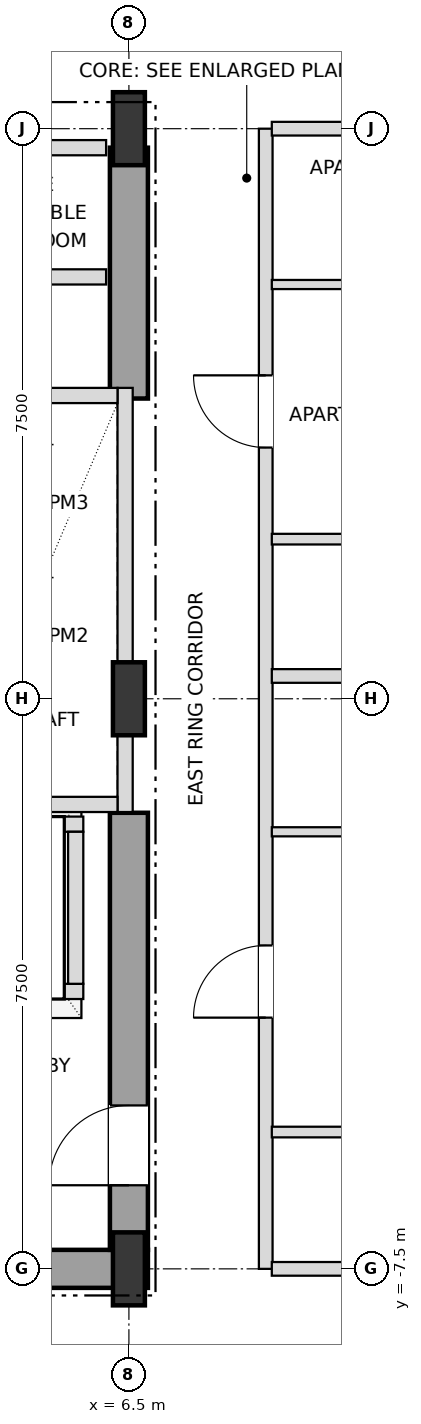
"""IFC4 building model, lengths in metres.
Left out: names, types, materials, properties, quantities, classifications, styles, units other than length and angle.
Written with IfcOpenShell. Run it as: python <this file> out.ifc"""

import sys

from ifc_helpers import new_model, si_unit, direction, frame, frame_2d, origin, origin_2d, place, context, subcontext, project, spatial, rectangle, i_section, extrude, element, fill, save


model = new_model("IFC4")
c1 = context("Model", 3, precision=1e-05, world=origin(), true_north=direction((0.0, 1.0)))
c2 = subcontext(c1, "Body", "Model", "MODEL_VIEW")
j1 = project(units=[si_unit("LENGTHUNIT", "METRE"), si_unit("PLANEANGLEUNIT", "RADIAN")], contexts=[c1])
p1 = place(None, origin())
s1 = spatial("IfcSite", under=j1, at=p1, CompositionType="ELEMENT")
p2 = place(p1, origin())
s2 = spatial("IfcBuilding", under=s1, at=p2, CompositionType="ELEMENT")
p3 = place(p2, frame((0.0, 0.0, 72.0)))
s3 = spatial("IfcBuildingStorey", under=s2, at=p3, CompositionType="ELEMENT", Elevation=72.0)
for number, where, z_axis, x_axis in (
    (1, (6.5, -7.5, 0.0), (0.0, 0.0, 1.0), (1.0, 0.0, 0.0)),
    (2, (6.5, 0.0, 0.0), (0.0, 0.0, 1.0), (1.0, 0.0, 0.0)),
    (3, (6.5, 7.5, 0.0), (0.0, 0.0, 1.0), (1.0, 0.0, 0.0)),
):
    element("IfcColumn", number, at=place(p3, frame(where, z_axis=z_axis, x_axis=x_axis)), inside=s3, PredefinedType="COLUMN", context=c2, shape_type="SweptSolid", body=[
        extrude(i_section(OverallWidth=0.42, OverallDepth=0.96, WebThickness=0.022, FlangeThickness=0.034, at=origin_2d()), origin(), (0.0, 0.0, 1.0), 3.6),
    ])
p4 = place(p3, frame((0.0, -7.5, 0.0), z_axis=(0.0, 0.0, 1.0), x_axis=(1.0, 0.0, 0.0)))
e4 = element("IfcWall", 4, at=p4, inside=s3, PredefinedType="SHEAR", context=c2, shape_type="SweptSolid", body=[
    extrude(rectangle(XDim=6.75, YDim=0.5, at=frame_2d((3.375, 0.0))), origin(), (0.0, 0.0, 1.0), 3.38),
])
p5 = place(p3, frame((6.5, -7.25, 0.0), z_axis=(0.0, 0.0, 1.0), x_axis=(0.0, 1.0, 0.0)))
e5 = element("IfcWall", 5, at=p5, inside=s3, PredefinedType="SHEAR", context=c2, shape_type="SweptSolid", body=[
    extrude(rectangle(XDim=5.75, YDim=0.5, at=frame_2d((2.875, 0.0))), origin(), (0.0, 0.0, 1.0), 3.38),
])
p6 = place(p5, frame((0.85, 0.0, 0.0)))
e6 = element("IfcOpeningElement", 6, at=p6, cuts=e5, PredefinedType="OPENING", context=c2, shape_type="SweptSolid", body=[
    extrude(rectangle(XDim=1.05, YDim=2.15, at=frame_2d((0.525, 1.075))), frame((0.0, 0.26, 0.0), z_axis=(0.0, -1.0, 0.0), x_axis=(1.0, 0.0, 0.0)), (0.0, 0.0, 1.0), 0.52),
])
p7 = place(p3, frame((6.5, 3.95, 0.0), z_axis=(0.0, 0.0, 1.0), x_axis=(0.0, 1.0, 0.0)))
e7 = element("IfcWall", 7, at=p7, inside=s3, PredefinedType="SHEAR", context=c2, shape_type="SweptSolid", body=[
    extrude(rectangle(XDim=3.3, YDim=0.5, at=frame_2d((1.65, 0.0))), origin(), (0.0, 0.0, 1.0), 3.38),
])
p8 = place(p3, frame((6.45, -1.49, 0.0), z_axis=(0.0, 0.0, 1.0), x_axis=(0.0, 1.0, 0.0)))
e8 = element("IfcWall", 8, at=p8, inside=s3, PredefinedType="SOLIDWALL", context=c2, shape_type="SweptSolid", body=[
    extrude(rectangle(XDim=5.58, YDim=0.2, at=frame_2d((2.79, 0.0))), origin(), (0.0, 0.0, 1.0), 2.816),
])
for number, where, z_axis, x_axis in (
    (9, (4.15, -1.39, 0.0), (0.0, 0.0, 1.0), (1.0, 0.0, 0.0)),
    (10, (4.15, 3.99, 0.0), (0.0, 0.0, 1.0), (1.0, 0.0, 0.0)),
):
    element("IfcWall", number, at=place(p3, frame(where, z_axis=z_axis, x_axis=x_axis)), inside=s3, PredefinedType="SOLIDWALL", context=c2, shape_type="SweptSolid", body=[
        extrude(rectangle(XDim=2.2, YDim=0.2, at=frame_2d((1.1, 0.0))), origin(), (0.0, 0.0, 1.0), 3.38),
    ])
p9 = place(p3, frame((1.8, -3.85, 0.0), z_axis=(0.0, 0.0, 1.0), x_axis=(1.0, 0.0, 0.0)))
e11 = element("IfcWall", 11, at=p9, inside=s3, PredefinedType="SOLIDWALL", context=c2, shape_type="SweptSolid", body=[
    extrude(rectangle(XDim=4.1, YDim=0.2, at=frame_2d((2.05, 0.0))), origin(), (0.0, 0.0, 1.0), 3.38),
])
p10 = place(p9, frame((0.45, 0.0, 0.0)))
e12 = element("IfcOpeningElement", 12, at=p10, cuts=e11, PredefinedType="OPENING", context=c2, shape_type="SweptSolid", body=[
    extrude(rectangle(XDim=1.2, YDim=2.2, at=frame_2d((0.6, 1.1))), frame((0.0, 0.11, 0.0), z_axis=(0.0, -1.0, 0.0), x_axis=(1.0, 0.0, 0.0)), (0.0, 0.0, 1.0), 0.22),
])
p11 = place(p9, frame((2.45, 0.0, 0.0)))
e13 = element("IfcOpeningElement", 13, at=p11, cuts=e11, PredefinedType="OPENING", context=c2, shape_type="SweptSolid", body=[
    extrude(rectangle(XDim=1.2, YDim=2.2, at=frame_2d((0.6, 1.1))), frame((0.0, 0.11, 0.0), z_axis=(0.0, -1.0, 0.0), x_axis=(1.0, 0.0, 0.0)), (0.0, 0.0, 1.0), 0.22),
])
p12 = place(p3, frame((1.8, -1.65, 0.0), z_axis=(0.0, 0.0, 1.0), x_axis=(1.0, 0.0, 0.0)))
e14 = element("IfcWall", 14, at=p12, inside=s3, PredefinedType="SOLIDWALL", context=c2, shape_type="SweptSolid", body=[
    extrude(rectangle(XDim=4.1, YDim=0.2, at=frame_2d((2.05, 0.0))), origin(), (0.0, 0.0, 1.0), 3.38),
])
p13 = place(p3, frame((5.8, -3.75, 0.0), z_axis=(0.0, 0.0, 1.0), x_axis=(0.0, 1.0, 0.0)))
e15 = element("IfcWall", 15, at=p13, inside=s3, PredefinedType="SOLIDWALL", context=c2, shape_type="SweptSolid", body=[
    extrude(rectangle(XDim=2.0, YDim=0.2, at=frame_2d((1.0, 0.0))), origin(), (0.0, 0.0, 1.0), 3.38),
])
p14 = place(p3, frame((8.3, -7.5, 0.0), z_axis=(0.0, 0.0, 1.0), x_axis=(0.0, 1.0, 0.0)))
e16 = element("IfcWall", 16, at=p14, inside=s3, PredefinedType="PARTITIONING", context=c2, shape_type="SweptSolid", body=[
    extrude(rectangle(XDim=15.0, YDim=0.18, at=frame_2d((7.5, 0.0))), origin(), (0.0, 0.0, 1.0), 3.38),
])
p15 = place(p14, frame((3.305, 0.0, 0.0)))
e17 = element("IfcOpeningElement", 17, at=p15, cuts=e16, PredefinedType="OPENING", context=c2, shape_type="SweptSolid", body=[
    extrude(rectangle(XDim=0.95, YDim=2.15, at=frame_2d((0.475, 1.075))), frame((0.0, 0.1, 0.0), z_axis=(0.0, -1.0, 0.0), x_axis=(1.0, 0.0, 0.0)), (0.0, 0.0, 1.0), 0.2),
])
p16 = place(p14, frame((10.805, 0.0, 0.0)))
e18 = element("IfcOpeningElement", 18, at=p16, cuts=e16, PredefinedType="OPENING", context=c2, shape_type="SweptSolid", body=[
    extrude(rectangle(XDim=0.95, YDim=2.15, at=frame_2d((0.475, 1.075))), frame((0.0, 0.1, 0.0), z_axis=(0.0, -1.0, 0.0), x_axis=(1.0, 0.0, 0.0)), (0.0, 0.0, 1.0), 0.2),
])
p17 = place(p3, frame((8.38, -7.5, 0.0), z_axis=(0.0, 0.0, 1.0), x_axis=(1.0, 0.0, 0.0)))
e19 = element("IfcWall", 19, at=p17, inside=s3, PredefinedType="PARTITIONING", context=c2, shape_type="SweptSolid", body=[
    extrude(rectangle(XDim=7.64, YDim=0.18, at=frame_2d((3.82, 0.0))), origin(), (0.0, 0.0, 1.0), 2.816),
])
p18 = place(p3, frame((8.38, -5.7, 0.0), z_axis=(0.0, 0.0, 1.0), x_axis=(1.0, 0.0, 0.0)))
e20 = element("IfcWall", 20, at=p18, inside=s3, PredefinedType="PARTITIONING", context=c2, shape_type="SweptSolid", body=[
    extrude(rectangle(XDim=7.64, YDim=0.14, at=frame_2d((3.82, 0.0))), origin(), (0.0, 0.0, 1.0), 2.948),
])
p19 = place(p18, frame((3.37, 0.0, 0.0)))
e21 = element("IfcOpeningElement", 21, at=p19, cuts=e20, PredefinedType="OPENING", context=c2, shape_type="SweptSolid", body=[
    extrude(rectangle(XDim=0.9, YDim=2.1, at=frame_2d((0.45, 1.05))), frame((0.0, 0.08, 0.0), z_axis=(0.0, -1.0, 0.0), x_axis=(1.0, 0.0, 0.0)), (0.0, 0.0, 1.0), 0.16),
])
p20 = place(p3, frame((8.38, -1.75, 0.0), z_axis=(0.0, 0.0, 1.0), x_axis=(1.0, 0.0, 0.0)))
e22 = element("IfcWall", 22, at=p20, inside=s3, PredefinedType="PARTITIONING", context=c2, shape_type="SweptSolid", body=[
    extrude(rectangle(XDim=7.64, YDim=0.12, at=frame_2d((3.82, 0.0))), origin(), (0.0, 0.0, 1.0), 2.948),
])
p21 = place(p20, frame((3.345, 0.0, 0.0)))
e23 = element("IfcOpeningElement", 23, at=p21, cuts=e22, PredefinedType="OPENING", context=c2, shape_type="SweptSolid", body=[
    extrude(rectangle(XDim=0.95, YDim=2.1, at=frame_2d((0.475, 1.05))), frame((0.0, 0.07, 0.0), z_axis=(0.0, -1.0, 0.0), x_axis=(1.0, 0.0, 0.0)), (0.0, 0.0, 1.0), 0.14),
])
p22 = place(p3, frame((8.38, 0.3, 0.0), z_axis=(0.0, 0.0, 1.0), x_axis=(1.0, 0.0, 0.0)))
e24 = element("IfcWall", 24, at=p22, inside=s3, PredefinedType="PARTITIONING", context=c2, shape_type="SweptSolid", body=[
    extrude(rectangle(XDim=7.64, YDim=0.18, at=frame_2d((3.82, 0.0))), origin(), (0.0, 0.0, 1.0), 2.948),
])
p23 = place(p3, frame((8.38, 2.1, 0.0), z_axis=(0.0, 0.0, 1.0), x_axis=(1.0, 0.0, 0.0)))
e25 = element("IfcWall", 25, at=p23, inside=s3, PredefinedType="PARTITIONING", context=c2, shape_type="SweptSolid", body=[
    extrude(rectangle(XDim=7.64, YDim=0.14, at=frame_2d((3.82, 0.0))), origin(), (0.0, 0.0, 1.0), 2.948),
])
p24 = place(p23, frame((3.37, 0.0, 0.0)))
e26 = element("IfcOpeningElement", 26, at=p24, cuts=e25, PredefinedType="OPENING", context=c2, shape_type="SweptSolid", body=[
    extrude(rectangle(XDim=0.9, YDim=2.1, at=frame_2d((0.45, 1.05))), frame((0.0, 0.08, 0.0), z_axis=(0.0, -1.0, 0.0), x_axis=(1.0, 0.0, 0.0)), (0.0, 0.0, 1.0), 0.16),
])
p25 = place(p3, frame((8.38, 5.45, 0.0), z_axis=(0.0, 0.0, 1.0), x_axis=(1.0, 0.0, 0.0)))
e27 = element("IfcWall", 27, at=p25, inside=s3, PredefinedType="PARTITIONING", context=c2, shape_type="SweptSolid", body=[
    extrude(rectangle(XDim=7.64, YDim=0.12, at=frame_2d((3.82, 0.0))), origin(), (0.0, 0.0, 1.0), 2.948),
])
p26 = place(p25, frame((3.345, 0.0, 0.0)))
e28 = element("IfcOpeningElement", 28, at=p26, cuts=e27, PredefinedType="OPENING", context=c2, shape_type="SweptSolid", body=[
    extrude(rectangle(XDim=0.95, YDim=2.1, at=frame_2d((0.475, 1.05))), frame((0.0, 0.07, 0.0), z_axis=(0.0, -1.0, 0.0), x_axis=(1.0, 0.0, 0.0)), (0.0, 0.0, 1.0), 0.14),
])
for number, where, z_axis, x_axis in (
    (29, (4.13, 5.55, 0.0), (0.0, 0.0, 1.0), (1.0, 0.0, 0.0)),
    (30, (4.13, 7.25, 0.0), (0.0, 0.0, 1.0), (1.0, 0.0, 0.0)),
):
    element("IfcWall", number, at=place(p3, frame(where, z_axis=z_axis, x_axis=x_axis)), inside=s3, PredefinedType="SOLIDWALL", context=c2, shape_type="SweptSolid", body=[
        extrude(rectangle(XDim=2.07, YDim=0.2, at=frame_2d((1.035, 0.0))), origin(), (0.0, 0.0, 1.0), 3.38),
    ])
p27 = place(p3, frame((8.38, 7.5, 0.0), z_axis=(0.0, 0.0, 1.0), x_axis=(1.0, 0.0, 0.0)))
e31 = element("IfcWall", 31, at=p27, inside=s3, PredefinedType="PARTITIONING", context=c2, shape_type="SweptSolid", body=[
    extrude(rectangle(XDim=7.64, YDim=0.18, at=frame_2d((3.82, 0.0))), origin(), (0.0, 0.0, 1.0), 2.816),
])
p28 = place(p6, origin())
e32 = element("IfcDoor", 32, at=p28, inside=s3, OperationType="SINGLE_SWING_LEFT", PredefinedType="DOOR", context=c2, shape_type="SweptSolid", body=[
    extrude(rectangle(XDim=1.05, YDim=2.15, at=frame_2d((0.525, 1.075))), frame((0.0, 0.025, 0.0), z_axis=(0.0, -1.0, 0.0), x_axis=(1.0, 0.0, 0.0)), (0.0, 0.0, 1.0), 0.05),
])
fill(e6, e32)
p29 = place(p15, origin())
e33 = element("IfcDoor", 33, at=p29, inside=s3, OperationType="SINGLE_SWING_LEFT", PredefinedType="DOOR", context=c2, shape_type="SweptSolid", body=[
    extrude(rectangle(XDim=0.95, YDim=2.15, at=frame_2d((0.475, 1.075))), frame((0.0, 0.025, 0.0), z_axis=(0.0, -1.0, 0.0), x_axis=(1.0, 0.0, 0.0)), (0.0, 0.0, 1.0), 0.05),
])
fill(e17, e33)
p30 = place(p16, origin())
e34 = element("IfcDoor", 34, at=p30, inside=s3, OperationType="SINGLE_SWING_RIGHT", PredefinedType="DOOR", context=c2, shape_type="SweptSolid", body=[
    extrude(rectangle(XDim=0.95, YDim=2.15, at=frame_2d((0.475, 1.075))), frame((0.0, 0.025, 0.0), z_axis=(0.0, -1.0, 0.0), x_axis=(1.0, 0.0, 0.0)), (0.0, 0.0, 1.0), 0.05),
])
fill(e18, e34)
save(model, sys.argv[1])
